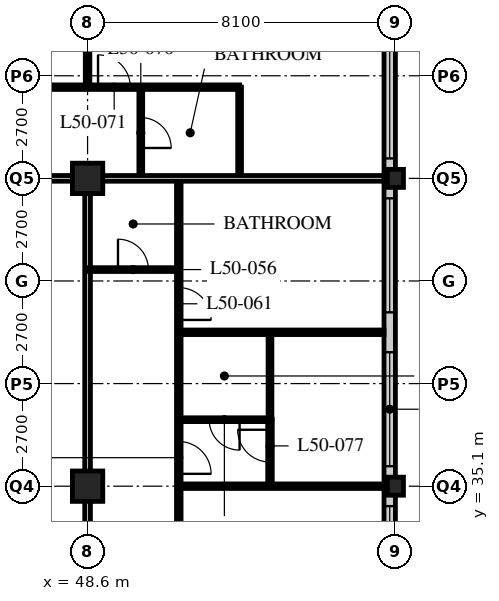
"""IFC4 building model, lengths in metres.
Left out: names, types, materials, properties, quantities, classifications, styles, units other than length and angle.
Written with IfcOpenShell. Run it as: python <this file> out.ifc"""

import sys

from ifc_helpers import new_model, si_unit, direction, frame, frame_2d, origin, origin_2d, place, context, subcontext, project, spatial, rectangle, hollow_rectangle, i_section, extrude, element, fill, save


model = new_model("IFC4")
c1 = context("Model", 3, precision=1e-05, world=origin(), true_north=direction((0.0, 1.0)))
c2 = subcontext(c1, "Body", "Model", "MODEL_VIEW")
j1 = project(units=[si_unit("LENGTHUNIT", "METRE"), si_unit("PLANEANGLEUNIT", "RADIAN")], contexts=[c1])
p1 = place(None, origin())
s1 = spatial("IfcSite", under=j1, at=p1, CompositionType="ELEMENT")
p2 = place(p1, origin())
s2 = spatial("IfcBuilding", under=s1, at=p2, CompositionType="ELEMENT")
p3 = place(p2, frame((0.0, 0.0, 195.6)))
s3 = spatial("IfcBuildingStorey", under=s2, at=p3, CompositionType="ELEMENT", Elevation=195.6)
for number, where, z_axis, x_axis in (
    (1, (48.6, 35.1, 0.0), (0.0, 0.0, 1.0), (1.0, 0.0, 0.0)),
    (2, (48.6, 43.2, 0.0), (0.0, 0.0, 1.0), (1.0, 0.0, 0.0)),
):
    element("IfcColumn", number, at=place(p3, frame(where, z_axis=z_axis, x_axis=x_axis)), inside=s3, PredefinedType="COLUMN", context=c2, shape_type="SweptSolid", body=[
        extrude(hollow_rectangle(XDim=0.8, YDim=0.8, WallThickness=0.08, at=origin_2d()), origin(), (0.0, 0.0, 1.0), 3.6),
    ])
for number, where, z_axis, x_axis in (
    (3, (56.7, 35.1, 0.0), (0.0, 0.0, 1.0), (1.0, 0.0, 0.0)),
    (4, (56.7, 43.2, 0.0), (0.0, 0.0, 1.0), (1.0, 0.0, 0.0)),
):
    element("IfcColumn", number, at=place(p3, frame(where, z_axis=z_axis, x_axis=x_axis)), inside=s3, PredefinedType="COLUMN", context=c2, shape_type="SweptSolid", body=[
        extrude(i_section(OverallWidth=0.424, OverallDepth=0.475, WebThickness=0.048, FlangeThickness=0.077, FilletRadius=0.015, at=origin_2d()), origin(), (0.0, 0.0, 1.0), 3.6),
    ])
p4 = place(p3, frame((56.55, 19.2, 0.0), z_axis=(0.0, 0.0, 1.0), x_axis=(0.0, 1.0, 0.0)))
e5 = element("IfcWall", 5, at=p4, inside=s3, PredefinedType="SOLIDWALL", context=c2, shape_type="SweptSolid", body=[
    extrude(rectangle(XDim=32.1, YDim=0.3, at=frame_2d((16.05, 0.0))), origin(), (0.0, 0.0, 1.0), 3.39),
])
p5 = place(p4, frame((0.225, 0.0, 0.6)))
e6 = element("IfcOpeningElement", 6, at=p5, cuts=e5, PredefinedType="OPENING", context=c2, shape_type="SweptSolid", body=[
    extrude(rectangle(XDim=3.0, YDim=2.4, at=frame_2d((1.5, 1.2))), frame((0.0, 0.16, 0.0), z_axis=(0.0, -1.0, 0.0), x_axis=(1.0, 0.0, 0.0)), (0.0, 0.0, 1.0), 0.32),
])
p6 = place(p4, frame((4.275, 0.0, 0.6)))
e7 = element("IfcOpeningElement", 7, at=p6, cuts=e5, PredefinedType="OPENING", context=c2, shape_type="SweptSolid", body=[
    extrude(rectangle(XDim=3.0, YDim=2.4, at=frame_2d((1.5, 1.2))), frame((0.0, 0.16, 0.0), z_axis=(0.0, -1.0, 0.0), x_axis=(1.0, 0.0, 0.0)), (0.0, 0.0, 1.0), 0.32),
])
p7 = place(p4, frame((8.325, 0.0, 0.6)))
e8 = element("IfcOpeningElement", 8, at=p7, cuts=e5, PredefinedType="OPENING", context=c2, shape_type="SweptSolid", body=[
    extrude(rectangle(XDim=3.0, YDim=2.4, at=frame_2d((1.5, 1.2))), frame((0.0, 0.16, 0.0), z_axis=(0.0, -1.0, 0.0), x_axis=(1.0, 0.0, 0.0)), (0.0, 0.0, 1.0), 0.32),
])
p8 = place(p4, frame((12.375, 0.0, 0.6)))
e9 = element("IfcOpeningElement", 9, at=p8, cuts=e5, PredefinedType="OPENING", context=c2, shape_type="SweptSolid", body=[
    extrude(rectangle(XDim=3.0, YDim=2.4, at=frame_2d((1.5, 1.2))), frame((0.0, 0.16, 0.0), z_axis=(0.0, -1.0, 0.0), x_axis=(1.0, 0.0, 0.0)), (0.0, 0.0, 1.0), 0.32),
])
p9 = place(p4, frame((16.425, 0.0, 0.6)))
e10 = element("IfcOpeningElement", 10, at=p9, cuts=e5, PredefinedType="OPENING", context=c2, shape_type="SweptSolid", body=[
    extrude(rectangle(XDim=3.0, YDim=2.4, at=frame_2d((1.5, 1.2))), frame((0.0, 0.16, 0.0), z_axis=(0.0, -1.0, 0.0), x_axis=(1.0, 0.0, 0.0)), (0.0, 0.0, 1.0), 0.32),
])
p10 = place(p4, frame((20.475, 0.0, 0.6)))
e11 = element("IfcOpeningElement", 11, at=p10, cuts=e5, PredefinedType="OPENING", context=c2, shape_type="SweptSolid", body=[
    extrude(rectangle(XDim=3.0, YDim=2.4, at=frame_2d((1.5, 1.2))), frame((0.0, 0.16, 0.0), z_axis=(0.0, -1.0, 0.0), x_axis=(1.0, 0.0, 0.0)), (0.0, 0.0, 1.0), 0.32),
])
p11 = place(p4, frame((24.525, 0.0, 0.6)))
e12 = element("IfcOpeningElement", 12, at=p11, cuts=e5, PredefinedType="OPENING", context=c2, shape_type="SweptSolid", body=[
    extrude(rectangle(XDim=3.0, YDim=2.4, at=frame_2d((1.5, 1.2))), frame((0.0, 0.16, 0.0), z_axis=(0.0, -1.0, 0.0), x_axis=(1.0, 0.0, 0.0)), (0.0, 0.0, 1.0), 0.32),
])
p12 = place(p4, frame((28.575, 0.0, 0.6)))
e13 = element("IfcOpeningElement", 13, at=p12, cuts=e5, PredefinedType="OPENING", context=c2, shape_type="SweptSolid", body=[
    extrude(rectangle(XDim=3.0, YDim=2.4, at=frame_2d((1.5, 1.2))), frame((0.0, 0.16, 0.0), z_axis=(0.0, -1.0, 0.0), x_axis=(1.0, 0.0, 0.0)), (0.0, 0.0, 1.0), 0.32),
])
p13 = place(p3, frame((8.1, 43.2, 0.0), z_axis=(0.0, 0.0, 1.0), x_axis=(1.0, 0.0, 0.0)))
e14 = element("IfcWall", 14, at=p13, inside=s3, PredefinedType="PARTITIONING", context=c2, shape_type="SweptSolid", body=[
    extrude(rectangle(XDim=40.5, YDim=0.15, at=frame_2d((20.25, 0.0))), origin(), (0.0, 0.0, 1.0), 2.778),
])
p14 = place(p13, frame((4.45, 0.0, 0.0)))
e15 = element("IfcOpeningElement", 15, at=p14, cuts=e14, PredefinedType="OPENING", context=c2, shape_type="SweptSolid", body=[
    extrude(rectangle(XDim=1.0, YDim=2.1, at=frame_2d((0.5, 1.05))), frame((0.0, 0.085, 0.0), z_axis=(0.0, -1.0, 0.0), x_axis=(1.0, 0.0, 0.0)), (0.0, 0.0, 1.0), 0.17),
])
p15 = place(p13, frame((20.65, 0.0, 0.0)))
e16 = element("IfcOpeningElement", 16, at=p15, cuts=e14, PredefinedType="OPENING", context=c2, shape_type="SweptSolid", body=[
    extrude(rectangle(XDim=1.0, YDim=2.1, at=frame_2d((0.5, 1.05))), frame((0.0, 0.085, 0.0), z_axis=(0.0, -1.0, 0.0), x_axis=(1.0, 0.0, 0.0)), (0.0, 0.0, 1.0), 0.17),
])
p16 = place(p13, frame((28.75, 0.0, 0.0)))
e17 = element("IfcOpeningElement", 17, at=p16, cuts=e14, PredefinedType="OPENING", context=c2, shape_type="SweptSolid", body=[
    extrude(rectangle(XDim=1.0, YDim=2.1, at=frame_2d((0.5, 1.05))), frame((0.0, 0.085, 0.0), z_axis=(0.0, -1.0, 0.0), x_axis=(1.0, 0.0, 0.0)), (0.0, 0.0, 1.0), 0.17),
])
p17 = place(p13, frame((37.975, 0.0, 0.0)))
e18 = element("IfcOpeningElement", 18, at=p17, cuts=e14, PredefinedType="OPENING", context=c2, shape_type="SweptSolid", body=[
    extrude(rectangle(XDim=1.0, YDim=2.1, at=frame_2d((0.5, 1.05))), frame((0.0, 0.085, 0.0), z_axis=(0.0, -1.0, 0.0), x_axis=(1.0, 0.0, 0.0)), (0.0, 0.0, 1.0), 0.17),
])
p18 = place(p13, frame((1.525, 0.0, 0.0)))
e19 = element("IfcOpeningElement", 19, at=p18, cuts=e14, PredefinedType="OPENING", context=c2, shape_type="SweptSolid", body=[
    extrude(rectangle(XDim=1.0, YDim=2.1, at=frame_2d((0.5, 1.05))), frame((0.0, 0.085, 0.0), z_axis=(0.0, -1.0, 0.0), x_axis=(1.0, 0.0, 0.0)), (0.0, 0.0, 1.0), 0.17),
])
p19 = place(p3, frame((48.6, 18.9, 0.0), z_axis=(0.0, 0.0, 1.0), x_axis=(0.0, 1.0, 0.0)))
e20 = element("IfcWall", 20, at=p19, inside=s3, PredefinedType="PARTITIONING", context=c2, shape_type="SweptSolid", body=[
    extrude(rectangle(XDim=24.3, YDim=0.15, at=frame_2d((12.15, 0.0))), origin(), (0.0, 0.0, 1.0), 2.778),
])
p20 = place(p19, frame((2.35, 0.0, 0.0)))
e21 = element("IfcOpeningElement", 21, at=p20, cuts=e20, PredefinedType="OPENING", context=c2, shape_type="SweptSolid", body=[
    extrude(rectangle(XDim=1.0, YDim=2.1, at=frame_2d((0.5, 1.05))), frame((0.0, 0.085, 0.0), z_axis=(0.0, -1.0, 0.0), x_axis=(1.0, 0.0, 0.0)), (0.0, 0.0, 1.0), 0.17),
])
p21 = place(p19, frame((4.75, 0.0, 0.0)))
e22 = element("IfcOpeningElement", 22, at=p21, cuts=e20, PredefinedType="OPENING", context=c2, shape_type="SweptSolid", body=[
    extrude(rectangle(XDim=1.0, YDim=2.1, at=frame_2d((0.5, 1.05))), frame((0.0, 0.085, 0.0), z_axis=(0.0, -1.0, 0.0), x_axis=(1.0, 0.0, 0.0)), (0.0, 0.0, 1.0), 0.17),
])
p22 = place(p19, frame((9.0, 0.0, 0.0)))
e23 = element("IfcOpeningElement", 23, at=p22, cuts=e20, PredefinedType="OPENING", context=c2, shape_type="SweptSolid", body=[
    extrude(rectangle(XDim=1.0, YDim=2.1, at=frame_2d((0.5, 1.05))), frame((0.0, 0.085, 0.0), z_axis=(0.0, -1.0, 0.0), x_axis=(1.0, 0.0, 0.0)), (0.0, 0.0, 1.0), 0.17),
])
p23 = place(p3, frame((51.0, 27.0, 0.0), z_axis=(0.0, 0.0, 1.0), x_axis=(0.0, 1.0, 0.0)))
e24 = element("IfcWall", 24, at=p23, inside=s3, PredefinedType="PARTITIONING", context=c2, shape_type="SweptSolid", body=[
    extrude(rectangle(XDim=16.2, YDim=0.12, at=frame_2d((8.1, 0.0))), origin(), (0.0, 0.0, 1.0), 3.39),
])
p24 = place(p23, frame((0.975, 0.0, 0.0)))
e25 = element("IfcOpeningElement", 25, at=p24, cuts=e24, PredefinedType="OPENING", context=c2, shape_type="SweptSolid", body=[
    extrude(rectangle(XDim=0.85, YDim=2.1, at=frame_2d((0.425, 1.05))), frame((0.0, 0.07, 0.0), z_axis=(0.0, -1.0, 0.0), x_axis=(1.0, 0.0, 0.0)), (0.0, 0.0, 1.0), 0.14),
])
p25 = place(p23, frame((8.425, 0.0, 0.0)))
e26 = element("IfcOpeningElement", 26, at=p25, cuts=e24, PredefinedType="OPENING", context=c2, shape_type="SweptSolid", body=[
    extrude(rectangle(XDim=0.85, YDim=2.1, at=frame_2d((0.425, 1.05))), frame((0.0, 0.07, 0.0), z_axis=(0.0, -1.0, 0.0), x_axis=(1.0, 0.0, 0.0)), (0.0, 0.0, 1.0), 0.14),
])
p26 = place(p23, frame((12.475, 0.0, 0.0)))
e27 = element("IfcOpeningElement", 27, at=p26, cuts=e24, PredefinedType="OPENING", context=c2, shape_type="SweptSolid", body=[
    extrude(rectangle(XDim=0.85, YDim=2.1, at=frame_2d((0.425, 1.05))), frame((0.0, 0.07, 0.0), z_axis=(0.0, -1.0, 0.0), x_axis=(1.0, 0.0, 0.0)), (0.0, 0.0, 1.0), 0.14),
])
p27 = place(p3, frame((48.6, 40.8, 0.0), z_axis=(0.0, 0.0, 1.0), x_axis=(1.0, 0.0, 0.0)))
e28 = element("IfcWall", 28, at=p27, inside=s3, PredefinedType="PARTITIONING", context=c2, shape_type="SweptSolid", body=[
    extrude(rectangle(XDim=2.4, YDim=0.1, at=frame_2d((1.2, 0.0))), origin(), (0.0, 0.0, 1.0), 3.39),
])
p28 = place(p27, frame((0.8, 0.0, 0.0)))
e29 = element("IfcOpeningElement", 29, at=p28, cuts=e28, PredefinedType="OPENING", context=c2, shape_type="SweptSolid", body=[
    extrude(rectangle(XDim=0.8, YDim=2.1, at=frame_2d((0.4, 1.05))), frame((0.0, 0.06, 0.0), z_axis=(0.0, -1.0, 0.0), x_axis=(1.0, 0.0, 0.0)), (0.0, 0.0, 1.0), 0.12),
])
p29 = place(p3, frame((51.0, 36.85, 0.0), z_axis=(0.0, 0.0, 1.0), x_axis=(1.0, 0.0, 0.0)))
e30 = element("IfcWall", 30, at=p29, inside=s3, PredefinedType="PARTITIONING", context=c2, shape_type="SweptSolid", body=[
    extrude(rectangle(XDim=2.4, YDim=0.1, at=frame_2d((1.2, 0.0))), origin(), (0.0, 0.0, 1.0), 3.39),
])
p30 = place(p29, frame((0.8, 0.0, 0.0)))
e31 = element("IfcOpeningElement", 31, at=p30, cuts=e30, PredefinedType="OPENING", context=c2, shape_type="SweptSolid", body=[
    extrude(rectangle(XDim=0.8, YDim=2.1, at=frame_2d((0.4, 1.05))), frame((0.0, 0.06, 0.0), z_axis=(0.0, -1.0, 0.0), x_axis=(1.0, 0.0, 0.0)), (0.0, 0.0, 1.0), 0.12),
])
p31 = place(p3, frame((53.4, 36.85, 0.0), z_axis=(0.0, 0.0, 1.0), x_axis=(0.0, 1.0, 0.0)))
e32 = element("IfcWall", 32, at=p31, inside=s3, PredefinedType="PARTITIONING", context=c2, shape_type="SweptSolid", body=[
    extrude(rectangle(XDim=2.3, YDim=0.1, at=frame_2d((1.15, 0.0))), origin(), (0.0, 0.0, 1.0), 3.39),
])
p32 = place(p3, frame((51.0, 35.1, 0.0), z_axis=(0.0, 0.0, 1.0), x_axis=(1.0, 0.0, 0.0)))
e33 = element("IfcWall", 33, at=p32, inside=s3, PredefinedType="PARTITIONING", context=c2, shape_type="SweptSolid", body=[
    extrude(rectangle(XDim=5.4, YDim=0.12, at=frame_2d((2.7, 0.0))), origin(), (0.0, 0.0, 1.0), 2.778),
])
p33 = place(p3, frame((51.0, 39.15, 0.0), z_axis=(0.0, 0.0, 1.0), x_axis=(1.0, 0.0, 0.0)))
e34 = element("IfcWall", 34, at=p33, inside=s3, PredefinedType="PARTITIONING", context=c2, shape_type="SweptSolid", body=[
    extrude(rectangle(XDim=5.4, YDim=0.12, at=frame_2d((2.7, 0.0))), origin(), (0.0, 0.0, 1.0), 3.39),
])
p34 = place(p3, frame((50.0, 43.2, 0.0), z_axis=(0.0, 0.0, 1.0), x_axis=(0.0, 1.0, 0.0)))
e35 = element("IfcWall", 35, at=p34, inside=s3, PredefinedType="PARTITIONING", context=c2, shape_type="SweptSolid", body=[
    extrude(rectangle(XDim=2.4, YDim=0.1, at=frame_2d((1.2, 0.0))), origin(), (0.0, 0.0, 1.0), 3.39),
])
p35 = place(p34, frame((0.8, 0.0, 0.0)))
e36 = element("IfcOpeningElement", 36, at=p35, cuts=e35, PredefinedType="OPENING", context=c2, shape_type="SweptSolid", body=[
    extrude(rectangle(XDim=0.8, YDim=2.1, at=frame_2d((0.4, 1.05))), frame((0.0, 0.06, 0.0), z_axis=(0.0, -1.0, 0.0), x_axis=(1.0, 0.0, 0.0)), (0.0, 0.0, 1.0), 0.12),
])
p36 = place(p3, frame((52.6, 43.2, 0.0), z_axis=(0.0, 0.0, 1.0), x_axis=(0.0, 1.0, 0.0)))
e37 = element("IfcWall", 37, at=p36, inside=s3, PredefinedType="PARTITIONING", context=c2, shape_type="SweptSolid", body=[
    extrude(rectangle(XDim=2.4, YDim=0.1, at=frame_2d((1.2, 0.0))), origin(), (0.0, 0.0, 1.0), 3.39),
])
p37 = place(p3, frame((48.6, 45.6, 0.0), z_axis=(0.0, 0.0, 1.0), x_axis=(0.0, 1.0, 0.0)))
e38 = element("IfcWall", 38, at=p37, inside=s3, PredefinedType="PARTITIONING", context=c2, shape_type="SweptSolid", body=[
    extrude(rectangle(XDim=9.45, YDim=0.12, at=frame_2d((4.725, 0.0))), origin(), (0.0, 0.0, 1.0), 2.778),
])
p38 = place(p3, frame((48.6, 43.2, 0.0), z_axis=(0.0, 0.0, 1.0), x_axis=(1.0, 0.0, 0.0)))
e39 = element("IfcWall", 39, at=p38, inside=s3, PredefinedType="PARTITIONING", context=c2, shape_type="SweptSolid", body=[
    extrude(rectangle(XDim=7.8, YDim=0.15, at=frame_2d((3.9, 0.0))), origin(), (0.0, 0.0, 1.0), 2.778),
])
p39 = place(p3, frame((4.1, 45.6, 0.0), z_axis=(0.0, 0.0, 1.0), x_axis=(1.0, 0.0, 0.0)))
e40 = element("IfcWall", 40, at=p39, inside=s3, PredefinedType="PARTITIONING", context=c2, shape_type="SweptSolid", body=[
    extrude(rectangle(XDim=48.5, YDim=0.12, at=frame_2d((24.25, 0.0))), origin(), (0.0, 0.0, 1.0), 3.39),
])
p40 = place(p39, frame((9.025, 0.0, 0.0)))
e41 = element("IfcOpeningElement", 41, at=p40, cuts=e40, PredefinedType="OPENING", context=c2, shape_type="SweptSolid", body=[
    extrude(rectangle(XDim=0.85, YDim=2.1, at=frame_2d((0.425, 1.05))), frame((0.0, 0.07, 0.0), z_axis=(0.0, -1.0, 0.0), x_axis=(1.0, 0.0, 0.0)), (0.0, 0.0, 1.0), 0.14),
])
p41 = place(p39, frame((16.475, 0.0, 0.0)))
e42 = element("IfcOpeningElement", 42, at=p41, cuts=e40, PredefinedType="OPENING", context=c2, shape_type="SweptSolid", body=[
    extrude(rectangle(XDim=0.85, YDim=2.1, at=frame_2d((0.425, 1.05))), frame((0.0, 0.07, 0.0), z_axis=(0.0, -1.0, 0.0), x_axis=(1.0, 0.0, 0.0)), (0.0, 0.0, 1.0), 0.14),
])
p42 = place(p39, frame((20.525, 0.0, 0.0)))
e43 = element("IfcOpeningElement", 43, at=p42, cuts=e40, PredefinedType="OPENING", context=c2, shape_type="SweptSolid", body=[
    extrude(rectangle(XDim=0.85, YDim=2.1, at=frame_2d((0.425, 1.05))), frame((0.0, 0.07, 0.0), z_axis=(0.0, -1.0, 0.0), x_axis=(1.0, 0.0, 0.0)), (0.0, 0.0, 1.0), 0.14),
])
p43 = place(p39, frame((25.225, 0.0, 0.0)))
e44 = element("IfcOpeningElement", 44, at=p43, cuts=e40, PredefinedType="OPENING", context=c2, shape_type="SweptSolid", body=[
    extrude(rectangle(XDim=0.85, YDim=2.1, at=frame_2d((0.425, 1.05))), frame((0.0, 0.07, 0.0), z_axis=(0.0, -1.0, 0.0), x_axis=(1.0, 0.0, 0.0)), (0.0, 0.0, 1.0), 0.14),
])
p44 = place(p39, frame((28.625, 0.0, 0.0)))
e45 = element("IfcOpeningElement", 45, at=p44, cuts=e40, PredefinedType="OPENING", context=c2, shape_type="SweptSolid", body=[
    extrude(rectangle(XDim=0.85, YDim=2.1, at=frame_2d((0.425, 1.05))), frame((0.0, 0.07, 0.0), z_axis=(0.0, -1.0, 0.0), x_axis=(1.0, 0.0, 0.0)), (0.0, 0.0, 1.0), 0.14),
])
p45 = place(p39, frame((33.325, 0.0, 0.0)))
e46 = element("IfcOpeningElement", 46, at=p45, cuts=e40, PredefinedType="OPENING", context=c2, shape_type="SweptSolid", body=[
    extrude(rectangle(XDim=0.85, YDim=2.1, at=frame_2d((0.425, 1.05))), frame((0.0, 0.07, 0.0), z_axis=(0.0, -1.0, 0.0), x_axis=(1.0, 0.0, 0.0)), (0.0, 0.0, 1.0), 0.14),
])
p46 = place(p39, frame((36.725, 0.0, 0.0)))
e47 = element("IfcOpeningElement", 47, at=p46, cuts=e40, PredefinedType="OPENING", context=c2, shape_type="SweptSolid", body=[
    extrude(rectangle(XDim=0.85, YDim=2.1, at=frame_2d((0.425, 1.05))), frame((0.0, 0.07, 0.0), z_axis=(0.0, -1.0, 0.0), x_axis=(1.0, 0.0, 0.0)), (0.0, 0.0, 1.0), 0.14),
])
p47 = place(p39, frame((40.925, 0.0, 0.0)))
e48 = element("IfcOpeningElement", 48, at=p47, cuts=e40, PredefinedType="OPENING", context=c2, shape_type="SweptSolid", body=[
    extrude(rectangle(XDim=0.85, YDim=2.1, at=frame_2d((0.425, 1.05))), frame((0.0, 0.07, 0.0), z_axis=(0.0, -1.0, 0.0), x_axis=(1.0, 0.0, 0.0)), (0.0, 0.0, 1.0), 0.14),
])
p48 = place(p39, frame((44.775, 0.0, 0.0)))
e49 = element("IfcOpeningElement", 49, at=p48, cuts=e40, PredefinedType="OPENING", context=c2, shape_type="SweptSolid", body=[
    extrude(rectangle(XDim=0.85, YDim=2.1, at=frame_2d((0.425, 1.05))), frame((0.0, 0.07, 0.0), z_axis=(0.0, -1.0, 0.0), x_axis=(1.0, 0.0, 0.0)), (0.0, 0.0, 1.0), 0.14),
])
p49 = place(p39, frame((6.725, 0.0, 0.0)))
e50 = element("IfcOpeningElement", 50, at=p49, cuts=e40, PredefinedType="OPENING", context=c2, shape_type="SweptSolid", body=[
    extrude(rectangle(XDim=0.85, YDim=2.1, at=frame_2d((0.425, 1.05))), frame((0.0, 0.07, 0.0), z_axis=(0.0, -1.0, 0.0), x_axis=(1.0, 0.0, 0.0)), (0.0, 0.0, 1.0), 0.14),
])
p50 = place(p39, frame((2.875, 0.0, 0.0)))
e51 = element("IfcOpeningElement", 51, at=p50, cuts=e40, PredefinedType="OPENING", context=c2, shape_type="SweptSolid", body=[
    extrude(rectangle(XDim=0.85, YDim=2.1, at=frame_2d((0.425, 1.05))), frame((0.0, 0.07, 0.0), z_axis=(0.0, -1.0, 0.0), x_axis=(1.0, 0.0, 0.0)), (0.0, 0.0, 1.0), 0.14),
])
p51 = place(p3, frame((53.4, 36.86, 0.0), z_axis=(0.0, 0.0, 1.0), x_axis=(0.0, -1.0, 0.0)))
e52 = element("IfcWall", 52, at=p51, inside=s3, PredefinedType="PARTITIONING", context=c2, shape_type="SweptSolid", body=[
    extrude(rectangle(XDim=1.76, YDim=0.12, at=frame_2d((0.88, 0.0))), origin(), (0.0, 0.0, 1.0), 3.39),
])
p52 = place(p51, frame((0.275, 0.0, 0.0)))
e53 = element("IfcOpeningElement", 53, at=p52, cuts=e52, PredefinedType="OPENING", context=c2, shape_type="SweptSolid", body=[
    extrude(rectangle(XDim=0.85, YDim=2.1, at=frame_2d((0.425, 1.05))), frame((0.0, 0.07, 0.0), z_axis=(0.0, -1.0, 0.0), x_axis=(1.0, 0.0, 0.0)), (0.0, 0.0, 1.0), 0.14),
])
p53 = place(p8, origin())
e54 = element("IfcWindow", 54, at=p53, inside=s3, PartitioningType="SINGLE_PANEL", PredefinedType="WINDOW", context=c2, shape_type="SweptSolid", body=[
    extrude(rectangle(XDim=3.0, YDim=2.4, at=frame_2d((1.5, 1.2))), frame((0.0, 0.03, 0.0), z_axis=(0.0, -1.0, 0.0), x_axis=(1.0, 0.0, 0.0)), (0.0, 0.0, 1.0), 0.06),
])
fill(e9, e54)
p54 = place(p9, origin())
e55 = element("IfcWindow", 55, at=p54, inside=s3, PartitioningType="SINGLE_PANEL", PredefinedType="WINDOW", context=c2, shape_type="SweptSolid", body=[
    extrude(rectangle(XDim=3.0, YDim=2.4, at=frame_2d((1.5, 1.2))), frame((0.0, 0.03, 0.0), z_axis=(0.0, -1.0, 0.0), x_axis=(1.0, 0.0, 0.0)), (0.0, 0.0, 1.0), 0.06),
])
fill(e10, e55)
p55 = place(p10, origin())
e56 = element("IfcWindow", 56, at=p55, inside=s3, PartitioningType="SINGLE_PANEL", PredefinedType="WINDOW", context=c2, shape_type="SweptSolid", body=[
    extrude(rectangle(XDim=3.0, YDim=2.4, at=frame_2d((1.5, 1.2))), frame((0.0, 0.03, 0.0), z_axis=(0.0, -1.0, 0.0), x_axis=(1.0, 0.0, 0.0)), (0.0, 0.0, 1.0), 0.06),
])
fill(e11, e56)
p56 = place(p11, origin())
e57 = element("IfcWindow", 57, at=p56, inside=s3, PartitioningType="SINGLE_PANEL", PredefinedType="WINDOW", context=c2, shape_type="SweptSolid", body=[
    extrude(rectangle(XDim=3.0, YDim=2.4, at=frame_2d((1.5, 1.2))), frame((0.0, 0.03, 0.0), z_axis=(0.0, -1.0, 0.0), x_axis=(1.0, 0.0, 0.0)), (0.0, 0.0, 1.0), 0.06),
])
fill(e12, e57)
p57 = place(p28, origin())
e58 = element("IfcDoor", 58, at=p57, inside=s3, OperationType="SINGLE_SWING_LEFT", PredefinedType="DOOR", context=c2, shape_type="SweptSolid", body=[
    extrude(rectangle(XDim=0.8, YDim=2.1, at=frame_2d((0.4, 1.05))), frame((0.0, 0.025, 0.0), z_axis=(0.0, -1.0, 0.0), x_axis=(1.0, 0.0, 0.0)), (0.0, 0.0, 1.0), 0.05),
])
fill(e29, e58)
p58 = place(p30, origin())
e59 = element("IfcDoor", 59, at=p58, inside=s3, OperationType="SINGLE_SWING_LEFT", PredefinedType="DOOR", context=c2, shape_type="SweptSolid", body=[
    extrude(rectangle(XDim=0.8, YDim=2.1, at=frame_2d((0.4, 1.05))), frame((0.0, 0.025, 0.0), z_axis=(0.0, -1.0, 0.0), x_axis=(1.0, 0.0, 0.0)), (0.0, 0.0, 1.0), 0.05),
])
fill(e31, e59)
p59 = place(p25, origin())
e60 = element("IfcDoor", 60, at=p59, inside=s3, OperationType="SINGLE_SWING_RIGHT", PredefinedType="DOOR", context=c2, shape_type="SweptSolid", body=[
    extrude(rectangle(XDim=0.85, YDim=2.1, at=frame_2d((0.425, 1.05))), frame((0.0, 0.025, 0.0), z_axis=(0.0, -1.0, 0.0), x_axis=(1.0, 0.0, 0.0)), (0.0, 0.0, 1.0), 0.05),
])
fill(e26, e60)
p60 = place(p26, origin())
e61 = element("IfcDoor", 61, at=p60, inside=s3, OperationType="SINGLE_SWING_RIGHT", PredefinedType="DOOR", context=c2, shape_type="SweptSolid", body=[
    extrude(rectangle(XDim=0.85, YDim=2.1, at=frame_2d((0.425, 1.05))), frame((0.0, 0.025, 0.0), z_axis=(0.0, -1.0, 0.0), x_axis=(1.0, 0.0, 0.0)), (0.0, 0.0, 1.0), 0.05),
])
fill(e27, e61)
p61 = place(p35, origin())
e62 = element("IfcDoor", 62, at=p61, inside=s3, OperationType="SINGLE_SWING_RIGHT", PredefinedType="DOOR", context=c2, shape_type="SweptSolid", body=[
    extrude(rectangle(XDim=0.8, YDim=2.1, at=frame_2d((0.4, 1.05))), frame((0.0, 0.025, 0.0), z_axis=(0.0, -1.0, 0.0), x_axis=(1.0, 0.0, 0.0)), (0.0, 0.0, 1.0), 0.05),
])
fill(e36, e62)
p62 = place(p48, origin())
e63 = element("IfcDoor", 63, at=p62, inside=s3, OperationType="SINGLE_SWING_LEFT", PredefinedType="DOOR", context=c2, shape_type="SweptSolid", body=[
    extrude(rectangle(XDim=0.85, YDim=2.1, at=frame_2d((0.425, 1.05))), frame((0.0, 0.025, 0.0), z_axis=(0.0, -1.0, 0.0), x_axis=(1.0, 0.0, 0.0)), (0.0, 0.0, 1.0), 0.05),
])
fill(e49, e63)
p63 = place(p52, origin())
e64 = element("IfcDoor", 64, at=p63, inside=s3, OperationType="SINGLE_SWING_RIGHT", PredefinedType="DOOR", context=c2, shape_type="SweptSolid", body=[
    extrude(rectangle(XDim=0.85, YDim=2.1, at=frame_2d((0.425, 1.05))), frame((0.0, 0.025, 0.0), z_axis=(0.0, -1.0, 0.0), x_axis=(1.0, 0.0, 0.0)), (0.0, 0.0, 1.0), 0.05),
])
fill(e53, e64)
save(model, sys.argv[1])
